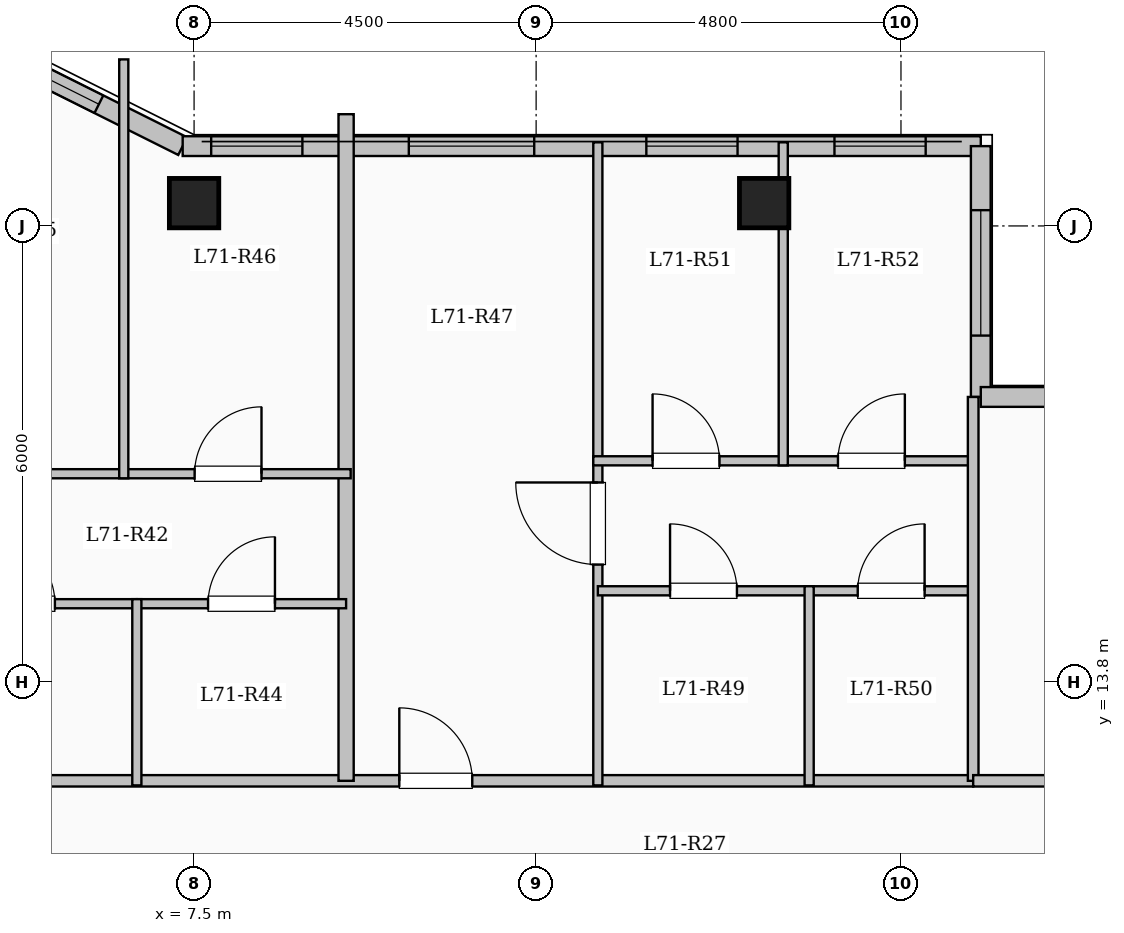
"""IFC4 building model, lengths in metres.
Left out: names, types, materials, properties, quantities, classifications, styles, units other than length and angle.
Written with IfcOpenShell. Run it as: python <this file> out.ifc"""

import sys

from ifc_helpers import new_model, si_unit, direction, frame, frame_2d, origin, origin_2d, place, context, subcontext, project, spatial, rectangle, extrude, element, fill, save


model = new_model("IFC4")
c1 = context("Model", 3, precision=1e-05, world=origin(), true_north=direction((0.0, 1.0)))
c2 = subcontext(c1, "Body", "Model", "MODEL_VIEW")
j1 = project(units=[si_unit("LENGTHUNIT", "METRE"), si_unit("PLANEANGLEUNIT", "RADIAN")], contexts=[c1])
p1 = place(None, origin())
s1 = spatial("IfcSite", under=j1, at=p1, CompositionType="ELEMENT")
p2 = place(p1, origin())
s2 = spatial("IfcBuilding", under=s1, at=p2, CompositionType="ELEMENT")
p3 = place(p2, frame((0.0, 0.0, 261.6)))
s3 = spatial("IfcBuildingStorey", under=s2, at=p3, CompositionType="ELEMENT", Elevation=261.6)
for number, where, z_axis, x_axis in (
    (1, (7.5, 20.1, 0.0), (0.0, 0.0, 1.0), (1.0, 0.0, 0.0)),
    (2, (15.0, 20.1, 0.0), (0.0, 0.0, 1.0), (1.0, 0.0, 0.0)),
):
    element("IfcColumn", number, at=place(p3, frame(where, z_axis=z_axis, x_axis=x_axis)), inside=s3, PredefinedType="COLUMN", context=c2, shape_type="SweptSolid", body=[
        extrude(rectangle(XDim=0.65, YDim=0.65, at=origin_2d()), origin(), (0.0, 0.0, 1.0), 3.35),
    ])
p4 = place(p3, frame((4.35, 22.35, 0.0), z_axis=(0.0, 0.0, 1.0), x_axis=(0.894427191, -0.4472135955, 0.0)))
e3 = element("IfcWall", 3, at=p4, inside=s3, PredefinedType="SOLIDWALL", context=c2, shape_type="SweptSolid", body=[
    extrude(rectangle(XDim=3.354, YDim=0.26, at=frame_2d((1.677, 0.0))), origin(), (0.0, 0.0, 1.0), 3.1),
])
p5 = place(p4, frame((0.772, 0.0, 0.95)))
e4 = element("IfcOpeningElement", 4, at=p5, cuts=e3, PredefinedType="OPENING", context=c2, shape_type="SweptSolid", body=[
    extrude(rectangle(XDim=1.35, YDim=1.55, at=frame_2d((0.675, 0.775))), frame((0.0, 0.14, 0.0), z_axis=(0.0, -1.0, 0.0), x_axis=(1.0, 0.0, 0.0)), (0.0, 0.0, 1.0), 0.28),
])
p6 = place(p3, frame((7.35, 20.85, 0.0), z_axis=(0.0, 0.0, 1.0), x_axis=(1.0, 0.0, 0.0)))
e5 = element("IfcWall", 5, at=p6, inside=s3, PredefinedType="SOLIDWALL", context=c2, shape_type="SweptSolid", body=[
    extrude(rectangle(XDim=10.5, YDim=0.26, at=frame_2d((5.25, 0.0))), origin(), (0.0, 0.0, 1.0), 3.1),
])
p7 = place(p6, frame((0.375, 0.0, 0.95)))
e6 = element("IfcOpeningElement", 6, at=p7, cuts=e5, PredefinedType="OPENING", context=c2, shape_type="SweptSolid", body=[
    extrude(rectangle(XDim=1.2, YDim=1.5, at=frame_2d((0.6, 0.75))), frame((0.0, 0.14, 0.0), z_axis=(0.0, -1.0, 0.0), x_axis=(1.0, 0.0, 0.0)), (0.0, 0.0, 1.0), 0.28),
])
p8 = place(p6, frame((2.975, 0.0, 0.9)))
e7 = element("IfcOpeningElement", 7, at=p8, cuts=e5, PredefinedType="OPENING", context=c2, shape_type="SweptSolid", body=[
    extrude(rectangle(XDim=1.65, YDim=1.6, at=frame_2d((0.825, 0.8))), frame((0.0, 0.14, 0.0), z_axis=(0.0, -1.0, 0.0), x_axis=(1.0, 0.0, 0.0)), (0.0, 0.0, 1.0), 0.28),
])
p9 = place(p6, frame((6.1, 0.0, 0.95)))
e8 = element("IfcOpeningElement", 8, at=p9, cuts=e5, PredefinedType="OPENING", context=c2, shape_type="SweptSolid", body=[
    extrude(rectangle(XDim=1.2, YDim=1.5, at=frame_2d((0.6, 0.75))), frame((0.0, 0.14, 0.0), z_axis=(0.0, -1.0, 0.0), x_axis=(1.0, 0.0, 0.0)), (0.0, 0.0, 1.0), 0.28),
])
p10 = place(p6, frame((8.575, 0.0, 0.95)))
e9 = element("IfcOpeningElement", 9, at=p10, cuts=e5, PredefinedType="OPENING", context=c2, shape_type="SweptSolid", body=[
    extrude(rectangle(XDim=1.2, YDim=1.5, at=frame_2d((0.6, 0.75))), frame((0.0, 0.14, 0.0), z_axis=(0.0, -1.0, 0.0), x_axis=(1.0, 0.0, 0.0)), (0.0, 0.0, 1.0), 0.28),
])
p11 = place(p3, frame((17.85, 20.85, 0.0), z_axis=(0.0, 0.0, 1.0), x_axis=(0.0, -1.0, 0.0)))
e10 = element("IfcWall", 10, at=p11, inside=s3, PredefinedType="SOLIDWALL", context=c2, shape_type="SweptSolid", body=[
    extrude(rectangle(XDim=3.3, YDim=0.26, at=frame_2d((1.65, 0.0))), origin(), (0.0, 0.0, 1.0), 3.1),
])
p12 = place(p11, frame((0.843, 0.0, 0.9)))
e11 = element("IfcOpeningElement", 11, at=p12, cuts=e10, PredefinedType="OPENING", context=c2, shape_type="SweptSolid", body=[
    extrude(rectangle(XDim=1.65, YDim=1.6, at=frame_2d((0.825, 0.8))), frame((0.0, 0.14, 0.0), z_axis=(0.0, -1.0, 0.0), x_axis=(1.0, 0.0, 0.0)), (0.0, 0.0, 1.0), 0.28),
])
p13 = place(p3, frame((17.85, 17.55, 0.0), z_axis=(0.0, 0.0, 1.0), x_axis=(1.0, 0.0, 0.0)))
e12 = element("IfcWall", 12, at=p13, inside=s3, PredefinedType="SOLIDWALL", context=c2, shape_type="SweptSolid", body=[
    extrude(rectangle(XDim=4.8, YDim=0.26, at=frame_2d((2.4, 0.0))), origin(), (0.0, 0.0, 1.0), 3.1),
])
p14 = place(p13, frame((1.375, 0.0, 0.9)))
e13 = element("IfcOpeningElement", 13, at=p14, cuts=e12, PredefinedType="OPENING", context=c2, shape_type="SweptSolid", body=[
    extrude(rectangle(XDim=2.0, YDim=1.7, at=frame_2d((1.0, 0.85))), frame((0.0, 0.14, 0.0), z_axis=(0.0, -1.0, 0.0), x_axis=(1.0, 0.0, 0.0)), (0.0, 0.0, 1.0), 0.28),
])
p15 = place(p3, frame((3.85, 12.5, 0.0), z_axis=(0.0, 0.0, 1.0), x_axis=(1.0, 0.0, 0.0)))
e14 = element("IfcWall", 14, at=p15, inside=s3, PredefinedType="PARTITIONING", context=c2, shape_type="SweptSolid", body=[
    extrude(rectangle(XDim=13.9, YDim=0.15, at=frame_2d((6.95, 0.0))), origin(), (0.0, 0.0, 1.0), 3.1),
])
p16 = place(p15, frame((0.7, 0.0, 0.0)))
e15 = element("IfcOpeningElement", 15, at=p16, cuts=e14, PredefinedType="OPENING", context=c2, shape_type="SweptSolid", body=[
    extrude(rectangle(XDim=0.96, YDim=2.15, at=frame_2d((0.48, 1.075))), frame((0.0, 0.085, 0.0), z_axis=(0.0, -1.0, 0.0), x_axis=(1.0, 0.0, 0.0)), (0.0, 0.0, 1.0), 0.17),
])
p17 = place(p15, frame((6.35, 0.0, 0.0)))
e16 = element("IfcOpeningElement", 16, at=p17, cuts=e14, PredefinedType="OPENING", context=c2, shape_type="SweptSolid", body=[
    extrude(rectangle(XDim=0.96, YDim=2.15, at=frame_2d((0.48, 1.075))), frame((0.0, 0.085, 0.0), z_axis=(0.0, -1.0, 0.0), x_axis=(1.0, 0.0, 0.0)), (0.0, 0.0, 1.0), 0.17),
])
p18 = place(p3, frame((9.5, 12.5, 0.0), z_axis=(0.0, 0.0, 1.0), x_axis=(0.0, 1.0, 0.0)))
e17 = element("IfcWall", 17, at=p18, inside=s3, PredefinedType="SOLIDWALL", context=c2, shape_type="SweptSolid", body=[
    extrude(rectangle(XDim=8.77, YDim=0.2, at=frame_2d((4.385, 0.0))), origin(), (0.0, 0.0, 1.0), 3.1),
])
p19 = place(p3, frame((3.71, 14.83, 0.0), z_axis=(0.0, 0.0, 1.0), x_axis=(1.0, 0.0, 0.0)))
e18 = element("IfcWall", 18, at=p19, inside=s3, PredefinedType="PARTITIONING", context=c2, shape_type="SweptSolid", body=[
    extrude(rectangle(XDim=3.037, YDim=0.12, at=frame_2d((1.519, 0.0))), origin(), (0.0, 0.0, 1.0), 3.1),
])
p20 = place(p19, frame((1.079, 0.0, 0.0)))
e19 = element("IfcOpeningElement", 19, at=p20, cuts=e18, PredefinedType="OPENING", context=c2, shape_type="SweptSolid", body=[
    extrude(rectangle(XDim=0.88, YDim=2.1, at=frame_2d((0.44, 1.05))), frame((0.0, 0.07, 0.0), z_axis=(0.0, -1.0, 0.0), x_axis=(1.0, 0.0, 0.0)), (0.0, 0.0, 1.0), 0.14),
])
p21 = place(p3, frame((6.747, 14.83, 0.0), z_axis=(0.0, 0.0, 1.0), x_axis=(1.0, 0.0, 0.0)))
e20 = element("IfcWall", 20, at=p21, inside=s3, PredefinedType="PARTITIONING", context=c2, shape_type="SweptSolid", body=[
    extrude(rectangle(XDim=2.753, YDim=0.12, at=frame_2d((1.376, 0.0))), origin(), (0.0, 0.0, 1.0), 3.1),
])
p22 = place(p21, frame((0.937, 0.0, 0.0)))
e21 = element("IfcOpeningElement", 21, at=p22, cuts=e20, PredefinedType="OPENING", context=c2, shape_type="SweptSolid", body=[
    extrude(rectangle(XDim=0.88, YDim=2.1, at=frame_2d((0.44, 1.05))), frame((0.0, 0.07, 0.0), z_axis=(0.0, -1.0, 0.0), x_axis=(1.0, 0.0, 0.0)), (0.0, 0.0, 1.0), 0.14),
])
p23 = place(p3, frame((3.65, 16.54, 0.0), z_axis=(0.0, 0.0, 1.0), x_axis=(1.0, 0.0, 0.0)))
e22 = element("IfcWall", 22, at=p23, inside=s3, PredefinedType="PARTITIONING", context=c2, shape_type="SweptSolid", body=[
    extrude(rectangle(XDim=5.91, YDim=0.12, at=frame_2d((2.955, 0.0))), origin(), (0.0, 0.0, 1.0), 3.1),
])
p24 = place(p23, frame((0.992, 0.0, 0.0)))
e23 = element("IfcOpeningElement", 23, at=p24, cuts=e22, PredefinedType="OPENING", context=c2, shape_type="SweptSolid", body=[
    extrude(rectangle(XDim=0.88, YDim=2.1, at=frame_2d((0.44, 1.05))), frame((0.0, 0.07, 0.0), z_axis=(0.0, -1.0, 0.0), x_axis=(1.0, 0.0, 0.0)), (0.0, 0.0, 1.0), 0.14),
])
p25 = place(p23, frame((3.857, 0.0, 0.0)))
e24 = element("IfcOpeningElement", 24, at=p25, cuts=e22, PredefinedType="OPENING", context=c2, shape_type="SweptSolid", body=[
    extrude(rectangle(XDim=0.88, YDim=2.1, at=frame_2d((0.44, 1.05))), frame((0.0, 0.07, 0.0), z_axis=(0.0, -1.0, 0.0), x_axis=(1.0, 0.0, 0.0)), (0.0, 0.0, 1.0), 0.14),
])
p26 = place(p3, frame((6.747, 12.44, 0.0), z_axis=(0.0, 0.0, 1.0), x_axis=(0.0, 1.0, 0.0)))
e25 = element("IfcWall", 25, at=p26, inside=s3, PredefinedType="PARTITIONING", context=c2, shape_type="SweptSolid", body=[
    extrude(rectangle(XDim=2.45, YDim=0.12, at=frame_2d((1.225, 0.0))), origin(), (0.0, 0.0, 1.0), 3.1),
])
p27 = place(p3, frame((6.575, 16.48, 0.0), z_axis=(0.0, 0.0, 1.0), x_axis=(0.0, 1.0, 0.0)))
e26 = element("IfcWall", 26, at=p27, inside=s3, PredefinedType="PARTITIONING", context=c2, shape_type="SweptSolid", body=[
    extrude(rectangle(XDim=5.511, YDim=0.12, at=frame_2d((2.755, 0.0))), origin(), (0.0, 0.0, 1.0), 3.1),
])
p28 = place(p3, frame((12.812, 12.44, 0.0), z_axis=(0.0, 0.0, 1.0), x_axis=(0.0, 1.0, 0.0)))
e27 = element("IfcWall", 27, at=p28, inside=s3, PredefinedType="PARTITIONING", context=c2, shape_type="SweptSolid", body=[
    extrude(rectangle(XDim=8.46, YDim=0.12, at=frame_2d((4.23, 0.0))), origin(), (0.0, 0.0, 1.0), 3.1),
])
p29 = place(p28, frame((2.905, 0.0, 0.0)))
e28 = element("IfcOpeningElement", 28, at=p29, cuts=e27, PredefinedType="OPENING", context=c2, shape_type="SweptSolid", body=[
    extrude(rectangle(XDim=1.08, YDim=2.15, at=frame_2d((0.54, 1.075))), frame((0.0, 0.07, 0.0), z_axis=(0.0, -1.0, 0.0), x_axis=(1.0, 0.0, 0.0)), (0.0, 0.0, 1.0), 0.14),
])
p30 = place(p3, frame((12.812, 15.0, 0.0), z_axis=(0.0, 0.0, 1.0), x_axis=(1.0, 0.0, 0.0)))
e29 = element("IfcWall", 29, at=p30, inside=s3, PredefinedType="PARTITIONING", context=c2, shape_type="SweptSolid", body=[
    extrude(rectangle(XDim=2.78, YDim=0.12, at=frame_2d((1.39, 0.0))), origin(), (0.0, 0.0, 1.0), 3.1),
])
p31 = place(p30, frame((0.95, 0.0, 0.0)))
e30 = element("IfcOpeningElement", 30, at=p31, cuts=e29, PredefinedType="OPENING", context=c2, shape_type="SweptSolid", body=[
    extrude(rectangle(XDim=0.88, YDim=2.1, at=frame_2d((0.44, 1.05))), frame((0.0, 0.07, 0.0), z_axis=(0.0, -1.0, 0.0), x_axis=(1.0, 0.0, 0.0)), (0.0, 0.0, 1.0), 0.14),
])
p32 = place(p3, frame((15.592, 15.0, 0.0), z_axis=(0.0, 0.0, 1.0), x_axis=(1.0, 0.0, 0.0)))
e31 = element("IfcWall", 31, at=p32, inside=s3, PredefinedType="PARTITIONING", context=c2, shape_type="SweptSolid", body=[
    extrude(rectangle(XDim=2.158, YDim=0.12, at=frame_2d((1.079, 0.0))), origin(), (0.0, 0.0, 1.0), 3.1),
])
p33 = place(p32, frame((0.639, 0.0, 0.0)))
e32 = element("IfcOpeningElement", 32, at=p33, cuts=e31, PredefinedType="OPENING", context=c2, shape_type="SweptSolid", body=[
    extrude(rectangle(XDim=0.88, YDim=2.1, at=frame_2d((0.44, 1.05))), frame((0.0, 0.07, 0.0), z_axis=(0.0, -1.0, 0.0), x_axis=(1.0, 0.0, 0.0)), (0.0, 0.0, 1.0), 0.14),
])
p34 = place(p3, frame((12.752, 16.71, 0.0), z_axis=(0.0, 0.0, 1.0), x_axis=(1.0, 0.0, 0.0)))
e33 = element("IfcWall", 33, at=p34, inside=s3, PredefinedType="PARTITIONING", context=c2, shape_type="SweptSolid", body=[
    extrude(rectangle(XDim=5.058, YDim=0.12, at=frame_2d((2.529, 0.0))), origin(), (0.0, 0.0, 1.0), 2.785),
])
p35 = place(p34, frame((0.78, 0.0, 0.0)))
e34 = element("IfcOpeningElement", 34, at=p35, cuts=e33, PredefinedType="OPENING", context=c2, shape_type="SweptSolid", body=[
    extrude(rectangle(XDim=0.88, YDim=2.1, at=frame_2d((0.44, 1.05))), frame((0.0, 0.07, 0.0), z_axis=(0.0, -1.0, 0.0), x_axis=(1.0, 0.0, 0.0)), (0.0, 0.0, 1.0), 0.14),
])
p36 = place(p34, frame((3.219, 0.0, 0.0)))
e35 = element("IfcOpeningElement", 35, at=p36, cuts=e33, PredefinedType="OPENING", context=c2, shape_type="SweptSolid", body=[
    extrude(rectangle(XDim=0.88, YDim=2.1, at=frame_2d((0.44, 1.05))), frame((0.0, 0.07, 0.0), z_axis=(0.0, -1.0, 0.0), x_axis=(1.0, 0.0, 0.0)), (0.0, 0.0, 1.0), 0.14),
])
p37 = place(p3, frame((15.592, 12.44, 0.0), z_axis=(0.0, 0.0, 1.0), x_axis=(0.0, 1.0, 0.0)))
e36 = element("IfcWall", 36, at=p37, inside=s3, PredefinedType="PARTITIONING", context=c2, shape_type="SweptSolid", body=[
    extrude(rectangle(XDim=2.62, YDim=0.12, at=frame_2d((1.31, 0.0))), origin(), (0.0, 0.0, 1.0), 3.1),
])
p38 = place(p3, frame((15.251, 16.65, 0.0), z_axis=(0.0, 0.0, 1.0), x_axis=(0.0, 1.0, 0.0)))
e37 = element("IfcWall", 37, at=p38, inside=s3, PredefinedType="PARTITIONING", context=c2, shape_type="SweptSolid", body=[
    extrude(rectangle(XDim=4.25, YDim=0.12, at=frame_2d((2.125, 0.0))), origin(), (0.0, 0.0, 1.0), 2.685),
])
p39 = place(p3, frame((17.75, 12.5, 0.0), z_axis=(0.0, 0.0, 1.0), x_axis=(0.0, 1.0, 0.0)))
e38 = element("IfcWall", 38, at=p39, inside=s3, PredefinedType="PARTITIONING", context=c2, shape_type="SweptSolid", body=[
    extrude(rectangle(XDim=5.05, YDim=0.14, at=frame_2d((2.525, 0.0))), origin(), (0.0, 0.0, 1.0), 3.1),
])
p40 = place(p3, frame((17.75, 12.5, 0.0), z_axis=(0.0, 0.0, 1.0), x_axis=(1.0, 0.0, 0.0)))
e39 = element("IfcWall", 39, at=p40, inside=s3, PredefinedType="PARTITIONING", context=c2, shape_type="SweptSolid", body=[
    extrude(rectangle(XDim=4.93, YDim=0.15, at=frame_2d((2.465, 0.0))), origin(), (0.0, 0.0, 1.0), 3.1),
])
p41 = place(p40, frame((1.99, 0.0, 0.0)))
e40 = element("IfcOpeningElement", 40, at=p41, cuts=e39, PredefinedType="OPENING", context=c2, shape_type="SweptSolid", body=[
    extrude(rectangle(XDim=0.95, YDim=2.15, at=frame_2d((0.475, 1.075))), frame((0.0, 0.085, 0.0), z_axis=(0.0, -1.0, 0.0), x_axis=(1.0, 0.0, 0.0)), (0.0, 0.0, 1.0), 0.17),
])
p42 = place(p5, origin())
e41 = element("IfcWindow", 41, at=p42, inside=s3, PartitioningType="SINGLE_PANEL", PredefinedType="WINDOW", context=c2, shape_type="SweptSolid", body=[
    extrude(rectangle(XDim=1.35, YDim=1.55, at=frame_2d((0.675, 0.775))), frame((0.0, 0.03, 0.0), z_axis=(0.0, -1.0, 0.0), x_axis=(1.0, 0.0, 0.0)), (0.0, 0.0, 1.0), 0.06),
])
fill(e4, e41)
p43 = place(p7, origin())
e42 = element("IfcWindow", 42, at=p43, inside=s3, PartitioningType="SINGLE_PANEL", PredefinedType="WINDOW", context=c2, shape_type="SweptSolid", body=[
    extrude(rectangle(XDim=1.2, YDim=1.5, at=frame_2d((0.6, 0.75))), frame((0.0, 0.03, 0.0), z_axis=(0.0, -1.0, 0.0), x_axis=(1.0, 0.0, 0.0)), (0.0, 0.0, 1.0), 0.06),
])
fill(e6, e42)
p44 = place(p8, origin())
e43 = element("IfcWindow", 43, at=p44, inside=s3, PartitioningType="SINGLE_PANEL", PredefinedType="WINDOW", context=c2, shape_type="SweptSolid", body=[
    extrude(rectangle(XDim=1.65, YDim=1.6, at=frame_2d((0.825, 0.8))), frame((0.0, 0.03, 0.0), z_axis=(0.0, -1.0, 0.0), x_axis=(1.0, 0.0, 0.0)), (0.0, 0.0, 1.0), 0.06),
])
fill(e7, e43)
p45 = place(p9, origin())
e44 = element("IfcWindow", 44, at=p45, inside=s3, PartitioningType="SINGLE_PANEL", PredefinedType="WINDOW", context=c2, shape_type="SweptSolid", body=[
    extrude(rectangle(XDim=1.2, YDim=1.5, at=frame_2d((0.6, 0.75))), frame((0.0, 0.03, 0.0), z_axis=(0.0, -1.0, 0.0), x_axis=(1.0, 0.0, 0.0)), (0.0, 0.0, 1.0), 0.06),
])
fill(e8, e44)
p46 = place(p10, origin())
e45 = element("IfcWindow", 45, at=p46, inside=s3, PartitioningType="SINGLE_PANEL", PredefinedType="WINDOW", context=c2, shape_type="SweptSolid", body=[
    extrude(rectangle(XDim=1.2, YDim=1.5, at=frame_2d((0.6, 0.75))), frame((0.0, 0.03, 0.0), z_axis=(0.0, -1.0, 0.0), x_axis=(1.0, 0.0, 0.0)), (0.0, 0.0, 1.0), 0.06),
])
fill(e9, e45)
p47 = place(p12, origin())
e46 = element("IfcWindow", 46, at=p47, inside=s3, PartitioningType="SINGLE_PANEL", PredefinedType="WINDOW", context=c2, shape_type="SweptSolid", body=[
    extrude(rectangle(XDim=1.65, YDim=1.6, at=frame_2d((0.825, 0.8))), frame((0.0, 0.03, 0.0), z_axis=(0.0, -1.0, 0.0), x_axis=(1.0, 0.0, 0.0)), (0.0, 0.0, 1.0), 0.06),
])
fill(e11, e46)
p48 = place(p20, origin())
e47 = element("IfcDoor", 47, at=p48, inside=s3, OperationType="SINGLE_SWING_LEFT", PredefinedType="DOOR", context=c2, shape_type="SweptSolid", body=[
    extrude(rectangle(XDim=0.88, YDim=2.1, at=frame_2d((0.44, 1.05))), frame((0.0, 0.025, 0.0), z_axis=(0.0, -1.0, 0.0), x_axis=(1.0, 0.0, 0.0)), (0.0, 0.0, 1.0), 0.05),
])
fill(e19, e47)
p49 = place(p22, origin())
e48 = element("IfcDoor", 48, at=p49, inside=s3, OperationType="SINGLE_SWING_RIGHT", PredefinedType="DOOR", context=c2, shape_type="SweptSolid", body=[
    extrude(rectangle(XDim=0.88, YDim=2.1, at=frame_2d((0.44, 1.05))), frame((0.0, 0.025, 0.0), z_axis=(0.0, -1.0, 0.0), x_axis=(1.0, 0.0, 0.0)), (0.0, 0.0, 1.0), 0.05),
])
fill(e21, e48)
p50 = place(p25, origin())
e49 = element("IfcDoor", 49, at=p50, inside=s3, OperationType="SINGLE_SWING_RIGHT", PredefinedType="DOOR", context=c2, shape_type="SweptSolid", body=[
    extrude(rectangle(XDim=0.88, YDim=2.1, at=frame_2d((0.44, 1.05))), frame((0.0, 0.025, 0.0), z_axis=(0.0, -1.0, 0.0), x_axis=(1.0, 0.0, 0.0)), (0.0, 0.0, 1.0), 0.05),
])
fill(e24, e49)
p51 = place(p17, origin())
e50 = element("IfcDoor", 50, at=p51, inside=s3, OperationType="SINGLE_SWING_LEFT", PredefinedType="DOOR", context=c2, shape_type="SweptSolid", body=[
    extrude(rectangle(XDim=0.96, YDim=2.15, at=frame_2d((0.48, 1.075))), frame((0.0, 0.025, 0.0), z_axis=(0.0, -1.0, 0.0), x_axis=(1.0, 0.0, 0.0)), (0.0, 0.0, 1.0), 0.05),
])
fill(e16, e50)
p52 = place(p29, origin())
e51 = element("IfcDoor", 51, at=p52, inside=s3, OperationType="SINGLE_SWING_RIGHT", PredefinedType="DOOR", context=c2, shape_type="SweptSolid", body=[
    extrude(rectangle(XDim=1.08, YDim=2.15, at=frame_2d((0.54, 1.075))), frame((0.0, 0.025, 0.0), z_axis=(0.0, -1.0, 0.0), x_axis=(1.0, 0.0, 0.0)), (0.0, 0.0, 1.0), 0.05),
])
fill(e28, e51)
p53 = place(p31, origin())
e52 = element("IfcDoor", 52, at=p53, inside=s3, OperationType="SINGLE_SWING_LEFT", PredefinedType="DOOR", context=c2, shape_type="SweptSolid", body=[
    extrude(rectangle(XDim=0.88, YDim=2.1, at=frame_2d((0.44, 1.05))), frame((0.0, 0.025, 0.0), z_axis=(0.0, -1.0, 0.0), x_axis=(1.0, 0.0, 0.0)), (0.0, 0.0, 1.0), 0.05),
])
fill(e30, e52)
p54 = place(p33, origin())
e53 = element("IfcDoor", 53, at=p54, inside=s3, OperationType="SINGLE_SWING_RIGHT", PredefinedType="DOOR", context=c2, shape_type="SweptSolid", body=[
    extrude(rectangle(XDim=0.88, YDim=2.1, at=frame_2d((0.44, 1.05))), frame((0.0, 0.025, 0.0), z_axis=(0.0, -1.0, 0.0), x_axis=(1.0, 0.0, 0.0)), (0.0, 0.0, 1.0), 0.05),
])
fill(e32, e53)
p55 = place(p35, origin())
e54 = element("IfcDoor", 54, at=p55, inside=s3, OperationType="SINGLE_SWING_LEFT", PredefinedType="DOOR", context=c2, shape_type="SweptSolid", body=[
    extrude(rectangle(XDim=0.88, YDim=2.1, at=frame_2d((0.44, 1.05))), frame((0.0, 0.025, 0.0), z_axis=(0.0, -1.0, 0.0), x_axis=(1.0, 0.0, 0.0)), (0.0, 0.0, 1.0), 0.05),
])
fill(e34, e54)
p56 = place(p36, origin())
e55 = element("IfcDoor", 55, at=p56, inside=s3, OperationType="SINGLE_SWING_RIGHT", PredefinedType="DOOR", context=c2, shape_type="SweptSolid", body=[
    extrude(rectangle(XDim=0.88, YDim=2.1, at=frame_2d((0.44, 1.05))), frame((0.0, 0.025, 0.0), z_axis=(0.0, -1.0, 0.0), x_axis=(1.0, 0.0, 0.0)), (0.0, 0.0, 1.0), 0.05),
])
fill(e35, e55)
save(model, sys.argv[1])
